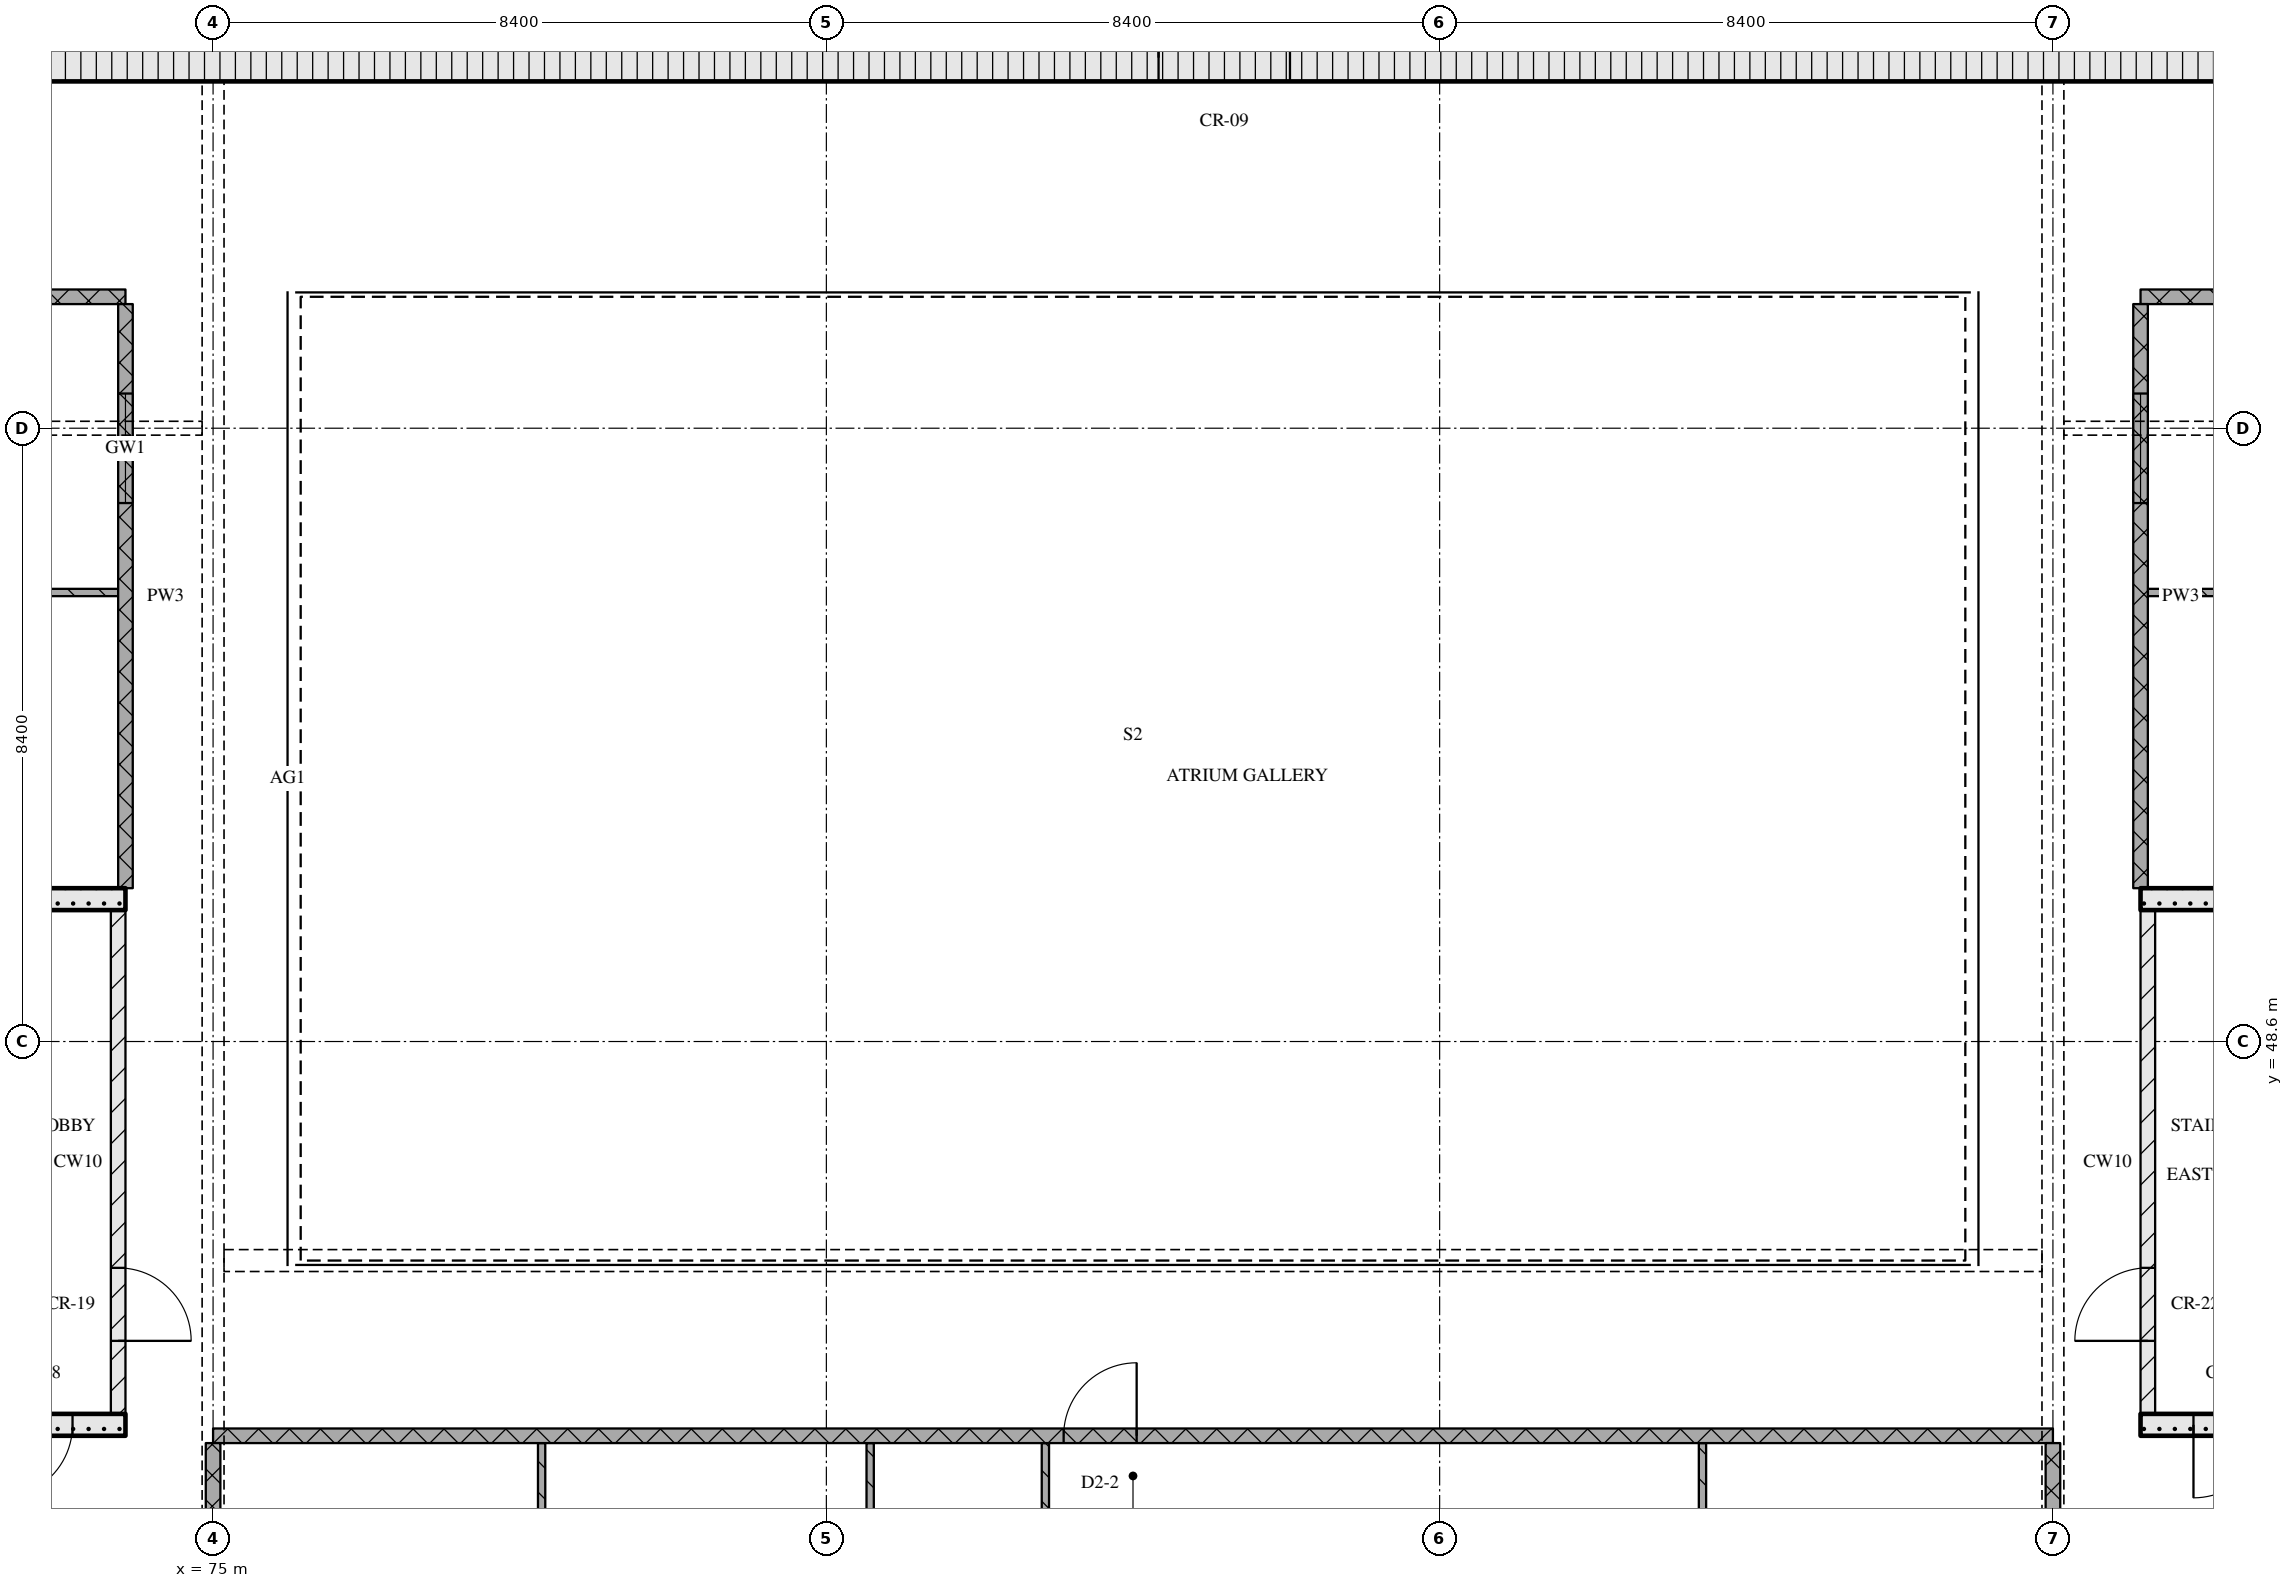
"""IFC4 building model, lengths in metres.
Left out: names, types, materials, properties, quantities, classifications, styles, units other than length and angle.
Written with IfcOpenShell. Run it as: python <this file> out.ifc"""

import sys

from ifc_helpers import new_model, si_unit, direction, frame, frame_2d, origin, place, context, subcontext, project, spatial, rectangle, extrude, element, fill, save


model = new_model("IFC4")
c1 = context("Model", 3, precision=1e-05, world=origin(), true_north=direction((0.0, 1.0)))
c2 = subcontext(c1, "Body", "Model", "MODEL_VIEW")
j1 = project(units=[si_unit("LENGTHUNIT", "METRE"), si_unit("PLANEANGLEUNIT", "RADIAN")], contexts=[c1])
p1 = place(None, origin())
s1 = spatial("IfcSite", under=j1, at=p1, CompositionType="ELEMENT")
p2 = place(p1, origin())
s2 = spatial("IfcBuilding", under=s1, at=p2, CompositionType="ELEMENT")
p3 = place(p2, frame((0.0, 0.0, 223.5)))
s3 = spatial("IfcBuildingStorey", under=s2, at=p3, CompositionType="ELEMENT", Elevation=223.5)
p4 = place(p3, frame((67.15, 62.075, 0.0), z_axis=(0.0, 0.0, 1.0), x_axis=(1.0, 0.0, 0.0)))
e1 = element("IfcWall", 1, at=p4, inside=s3, PredefinedType="SOLIDWALL", context=c2, shape_type="SweptSolid", body=[
    extrude(rectangle(XDim=40.9, YDim=0.65, at=frame_2d((20.45, 0.0))), origin(), (0.0, 0.0, 1.0), 3.32),
])
p5 = place(p4, frame((20.8, 0.0, 0.0)))
e2 = element("IfcOpeningElement", 2, at=p5, cuts=e1, PredefinedType="OPENING", context=c2, shape_type="SweptSolid", body=[
    extrude(rectangle(XDim=1.8, YDim=2.1, at=frame_2d((0.9, 1.05))), frame((0.0, 0.335, 0.0), z_axis=(0.0, -1.0, 0.0), x_axis=(1.0, 0.0, 0.0)), (0.0, 0.0, 1.0), 0.67),
])
p6 = place(p3, frame((68.2, 43.35, 0.0), z_axis=(0.0, 0.0, 1.0), x_axis=(1.0, 0.0, 0.0)))
e3 = element("IfcWall", 3, at=p6, inside=s3, PredefinedType="SOLIDWALL", context=c2, shape_type="SweptSolid", body=[
    extrude(rectangle(XDim=5.6, YDim=0.3, at=frame_2d((2.8, 0.0))), origin(), (0.0, 0.0, 1.0), 3.32),
])
p7 = place(p6, frame((3.875, 0.0, 0.0)))
e4 = element("IfcOpeningElement", 4, at=p7, cuts=e3, PredefinedType="OPENING", context=c2, shape_type="SweptSolid", body=[
    extrude(rectangle(XDim=1.0, YDim=2.1, at=frame_2d((0.5, 1.05))), frame((0.0, 0.16, 0.0), z_axis=(0.0, -1.0, 0.0), x_axis=(1.0, 0.0, 0.0)), (0.0, 0.0, 1.0), 0.32),
])
p8 = place(p3, frame((73.7, 43.5, 0.0), z_axis=(0.0, 0.0, 1.0), x_axis=(0.0, 1.0, 0.0)))
e5 = element("IfcWall", 5, at=p8, inside=s3, PredefinedType="PARTITIONING", context=c2, shape_type="SweptSolid", body=[
    extrude(rectangle(XDim=6.9, YDim=0.2, at=frame_2d((3.45, 0.0))), origin(), (0.0, 0.0, 1.0), 3.32),
])
p9 = place(p8, frame((1.0, 0.0, 0.0)))
e6 = element("IfcOpeningElement", 6, at=p9, cuts=e5, PredefinedType="OPENING", context=c2, shape_type="SweptSolid", body=[
    extrude(rectangle(XDim=1.0, YDim=2.1, at=frame_2d((0.5, 1.05))), frame((0.0, 0.11, 0.0), z_axis=(0.0, -1.0, 0.0), x_axis=(1.0, 0.0, 0.0)), (0.0, 0.0, 1.0), 0.22),
])
p10 = place(p3, frame((68.2, 50.55, 0.0), z_axis=(0.0, 0.0, 1.0), x_axis=(1.0, 0.0, 0.0)))
e7 = element("IfcWall", 7, at=p10, inside=s3, PredefinedType="SOLIDWALL", context=c2, shape_type="SweptSolid", body=[
    extrude(rectangle(XDim=5.6, YDim=0.3, at=frame_2d((2.8, 0.0))), origin(), (0.0, 0.0, 1.0), 3.32),
])
p11 = place(p3, frame((101.4, 43.35, 0.0), z_axis=(0.0, 0.0, 1.0), x_axis=(1.0, 0.0, 0.0)))
e8 = element("IfcWall", 8, at=p11, inside=s3, PredefinedType="SOLIDWALL", context=c2, shape_type="SweptSolid", body=[
    extrude(rectangle(XDim=5.6, YDim=0.3, at=frame_2d((2.8, 0.0))), origin(), (0.0, 0.0, 1.0), 3.32),
])
p12 = place(p11, frame((0.725, 0.0, 0.0)))
e9 = element("IfcOpeningElement", 9, at=p12, cuts=e8, PredefinedType="OPENING", context=c2, shape_type="SweptSolid", body=[
    extrude(rectangle(XDim=1.0, YDim=2.1, at=frame_2d((0.5, 1.05))), frame((0.0, 0.16, 0.0), z_axis=(0.0, -1.0, 0.0), x_axis=(1.0, 0.0, 0.0)), (0.0, 0.0, 1.0), 0.32),
])
p13 = place(p3, frame((101.5, 43.5, 0.0), z_axis=(0.0, 0.0, 1.0), x_axis=(0.0, 1.0, 0.0)))
e10 = element("IfcWall", 10, at=p13, inside=s3, PredefinedType="PARTITIONING", context=c2, shape_type="SweptSolid", body=[
    extrude(rectangle(XDim=6.9, YDim=0.2, at=frame_2d((3.45, 0.0))), origin(), (0.0, 0.0, 1.0), 3.32),
])
p14 = place(p13, frame((1.0, 0.0, 0.0)))
e11 = element("IfcOpeningElement", 11, at=p14, cuts=e10, PredefinedType="OPENING", context=c2, shape_type="SweptSolid", body=[
    extrude(rectangle(XDim=1.0, YDim=2.1, at=frame_2d((0.5, 1.05))), frame((0.0, 0.11, 0.0), z_axis=(0.0, -1.0, 0.0), x_axis=(1.0, 0.0, 0.0)), (0.0, 0.0, 1.0), 0.22),
])
p15 = place(p3, frame((101.4, 50.55, 0.0), z_axis=(0.0, 0.0, 1.0), x_axis=(1.0, 0.0, 0.0)))
e12 = element("IfcWall", 12, at=p15, inside=s3, PredefinedType="SOLIDWALL", context=c2, shape_type="SweptSolid", body=[
    extrude(rectangle(XDim=5.6, YDim=0.3, at=frame_2d((2.8, 0.0))), origin(), (0.0, 0.0, 1.0), 3.32),
])
p16 = place(p3, frame((100.2, 43.2, 0.0), z_axis=(0.0, 0.0, 1.0), x_axis=(-1.0, 0.0, 0.0)))
e13 = element("IfcWall", 13, at=p16, inside=s3, PredefinedType="PARTITIONING", context=c2, shape_type="SweptSolid", body=[
    extrude(rectangle(XDim=25.2, YDim=0.2, at=frame_2d((12.6, 0.0))), origin(), (0.0, 0.0, 1.0), 3.32),
])
p17 = place(p16, frame((12.55, 0.0, 0.0)))
e14 = element("IfcOpeningElement", 14, at=p17, cuts=e13, PredefinedType="OPENING", context=c2, shape_type="SweptSolid", body=[
    extrude(rectangle(XDim=1.0, YDim=2.1, at=frame_2d((0.5, 1.05))), frame((0.0, 0.11, 0.0), z_axis=(0.0, -1.0, 0.0), x_axis=(1.0, 0.0, 0.0)), (0.0, 0.0, 1.0), 0.22),
])
p18 = place(p3, frame((67.5, 54.75, 0.0), z_axis=(0.0, 0.0, 1.0), x_axis=(1.0, 0.0, 0.0)))
e15 = element("IfcWall", 15, at=p18, inside=s3, PredefinedType="PARTITIONING", context=c2, shape_type="SweptSolid", body=[
    extrude(rectangle(XDim=6.2, YDim=0.1, at=frame_2d((3.1, 0.0))), origin(), (0.0, 0.0, 1.0), 3.32),
])
p19 = place(p3, frame((101.5, 54.75, 0.0), z_axis=(0.0, 0.0, 1.0), x_axis=(1.0, 0.0, 0.0)))
e16 = element("IfcWall", 16, at=p19, inside=s3, PredefinedType="PARTITIONING", context=c2, shape_type="SweptSolid", body=[
    extrude(rectangle(XDim=6.8, YDim=0.1, at=frame_2d((3.4, 0.0))), origin(), (0.0, 0.0, 1.0), 3.32),
])
p20 = place(p19, frame((2.9, 0.0, 0.0)))
e17 = element("IfcOpeningElement", 17, at=p20, cuts=e16, PredefinedType="OPENING", context=c2, shape_type="SweptSolid", body=[
    extrude(rectangle(XDim=0.9, YDim=2.1, at=frame_2d((0.45, 1.05))), frame((0.0, 0.06, 0.0), z_axis=(0.0, -1.0, 0.0), x_axis=(1.0, 0.0, 0.0)), (0.0, 0.0, 1.0), 0.12),
])
for number, where, z_axis, x_axis in (
    (18, (63.0, 58.8, 0.0), (0.0, 0.0, 1.0), (1.0, 0.0, 0.0)),
    (19, (101.4, 58.8, 0.0), (0.0, 0.0, 1.0), (1.0, 0.0, 0.0)),
):
    element("IfcWall", number, at=place(p3, frame(where, z_axis=z_axis, x_axis=x_axis)), inside=s3, PredefinedType="PARTITIONING", context=c2, shape_type="SweptSolid", body=[
        extrude(rectangle(XDim=10.8, YDim=0.2, at=frame_2d((5.4, 0.0))), origin(), (0.0, 0.0, 1.0), 3.32),
    ])
p21 = place(p3, frame((73.8, 58.7, 0.0), z_axis=(0.0, 0.0, 1.0), x_axis=(0.0, -1.0, 0.0)))
e20 = element("IfcWall", 20, at=p21, inside=s3, PredefinedType="PARTITIONING", context=c2, shape_type="SweptSolid", body=[
    extrude(rectangle(XDim=8.0, YDim=0.2, at=frame_2d((4.0, 0.0))), origin(), (0.0, 0.0, 1.0), 3.32),
])
p22 = place(p21, frame((1.225, 0.0, 0.9)))
e21 = element("IfcOpeningElement", 21, at=p22, cuts=e20, PredefinedType="OPENING", context=c2, shape_type="SweptSolid", body=[
    extrude(rectangle(XDim=1.5, YDim=1.5, at=frame_2d((0.75, 0.75))), frame((0.0, 0.11, 0.0), z_axis=(0.0, -1.0, 0.0), x_axis=(1.0, 0.0, 0.0)), (0.0, 0.0, 1.0), 0.22),
])
p23 = place(p3, frame((75.0, 43.1, 0.0), z_axis=(0.0, 0.0, 1.0), x_axis=(0.0, -1.0, 0.0)))
e22 = element("IfcWall", 22, at=p23, inside=s3, PredefinedType="PARTITIONING", context=c2, shape_type="SweptSolid", body=[
    extrude(rectangle(XDim=2.2, YDim=0.2, at=frame_2d((1.1, 0.0))), origin(), (0.0, 0.0, 1.0), 2.53),
])
for number, where, z_axis, x_axis in (
    (23, (79.5, 43.1, 0.0), (0.0, 0.0, 1.0), (0.0, -1.0, 0.0)),
    (24, (84.0, 43.1, 0.0), (0.0, 0.0, 1.0), (0.0, -1.0, 0.0)),
    (25, (86.4, 43.1, 0.0), (0.0, 0.0, 1.0), (0.0, -1.0, 0.0)),
    (26, (95.4, 43.1, 0.0), (0.0, 0.0, 1.0), (0.0, -1.0, 0.0)),
):
    element("IfcWall", number, at=place(p3, frame(where, z_axis=z_axis, x_axis=x_axis)), inside=s3, PredefinedType="PARTITIONING", context=c2, shape_type="SweptSolid", body=[
        extrude(rectangle(XDim=4.95, YDim=0.1, at=frame_2d((2.475, 0.0))), origin(), (0.0, 0.0, 1.0), 3.32),
    ])
p24 = place(p3, frame((100.2, 43.1, 0.0), z_axis=(0.0, 0.0, 1.0), x_axis=(0.0, -1.0, 0.0)))
e27 = element("IfcWall", 27, at=p24, inside=s3, PredefinedType="PARTITIONING", context=c2, shape_type="SweptSolid", body=[
    extrude(rectangle(XDim=2.2, YDim=0.2, at=frame_2d((1.1, 0.0))), origin(), (0.0, 0.0, 1.0), 2.53),
])
p25 = place(p3, frame((101.4, 58.7, 0.0), z_axis=(0.0, 0.0, 1.0), x_axis=(0.0, -1.0, 0.0)))
e28 = element("IfcWall", 28, at=p25, inside=s3, PredefinedType="PARTITIONING", context=c2, shape_type="SweptSolid", body=[
    extrude(rectangle(XDim=8.0, YDim=0.2, at=frame_2d((4.0, 0.0))), origin(), (0.0, 0.0, 1.0), 3.32),
])
p26 = place(p25, frame((1.225, 0.0, 0.9)))
e29 = element("IfcOpeningElement", 29, at=p26, cuts=e28, PredefinedType="OPENING", context=c2, shape_type="SweptSolid", body=[
    extrude(rectangle(XDim=1.5, YDim=1.5, at=frame_2d((0.75, 0.75))), frame((0.0, 0.11, 0.0), z_axis=(0.0, -1.0, 0.0), x_axis=(1.0, 0.0, 0.0)), (0.0, 0.0, 1.0), 0.22),
])
p27 = place(p5, origin())
e30 = element("IfcDoor", 30, at=p27, inside=s3, OperationType="DOUBLE_DOOR_SINGLE_SWING", PredefinedType="DOOR", context=c2, shape_type="SweptSolid", body=[
    extrude(rectangle(XDim=1.8, YDim=2.1, at=frame_2d((0.9, 1.05))), frame((0.0, 0.025, 0.0), z_axis=(0.0, -1.0, 0.0), x_axis=(1.0, 0.0, 0.0)), (0.0, 0.0, 1.0), 0.05),
])
fill(e2, e30)
p28 = place(p7, origin())
e31 = element("IfcDoor", 31, at=p28, inside=s3, OperationType="SINGLE_SWING_RIGHT", PredefinedType="DOOR", context=c2, shape_type="SweptSolid", body=[
    extrude(rectangle(XDim=1.0, YDim=2.1, at=frame_2d((0.5, 1.05))), frame((0.0, 0.025, 0.0), z_axis=(0.0, -1.0, 0.0), x_axis=(1.0, 0.0, 0.0)), (0.0, 0.0, 1.0), 0.05),
])
fill(e4, e31)
p29 = place(p9, origin())
e32 = element("IfcDoor", 32, at=p29, inside=s3, OperationType="SINGLE_SWING_RIGHT", PredefinedType="DOOR", context=c2, shape_type="SweptSolid", body=[
    extrude(rectangle(XDim=1.0, YDim=2.1, at=frame_2d((0.5, 1.05))), frame((0.0, 0.025, 0.0), z_axis=(0.0, -1.0, 0.0), x_axis=(1.0, 0.0, 0.0)), (0.0, 0.0, 1.0), 0.05),
])
fill(e6, e32)
p30 = place(p12, origin())
e33 = element("IfcDoor", 33, at=p30, inside=s3, OperationType="SINGLE_SWING_RIGHT", PredefinedType="DOOR", context=c2, shape_type="SweptSolid", body=[
    extrude(rectangle(XDim=1.0, YDim=2.1, at=frame_2d((0.5, 1.05))), frame((0.0, 0.025, 0.0), z_axis=(0.0, -1.0, 0.0), x_axis=(1.0, 0.0, 0.0)), (0.0, 0.0, 1.0), 0.05),
])
fill(e9, e33)
p31 = place(p14, origin())
e34 = element("IfcDoor", 34, at=p31, inside=s3, OperationType="SINGLE_SWING_LEFT", PredefinedType="DOOR", context=c2, shape_type="SweptSolid", body=[
    extrude(rectangle(XDim=1.0, YDim=2.1, at=frame_2d((0.5, 1.05))), frame((0.0, 0.025, 0.0), z_axis=(0.0, -1.0, 0.0), x_axis=(1.0, 0.0, 0.0)), (0.0, 0.0, 1.0), 0.05),
])
fill(e11, e34)
p32 = place(p17, origin())
e35 = element("IfcDoor", 35, at=p32, inside=s3, OperationType="SINGLE_SWING_RIGHT", PredefinedType="DOOR", context=c2, shape_type="SweptSolid", body=[
    extrude(rectangle(XDim=1.0, YDim=2.1, at=frame_2d((0.5, 1.05))), frame((0.0, 0.025, 0.0), z_axis=(0.0, -1.0, 0.0), x_axis=(1.0, 0.0, 0.0)), (0.0, 0.0, 1.0), 0.05),
])
fill(e14, e35)
p33 = place(p22, origin())
e36 = element("IfcWindow", 36, at=p33, inside=s3, PartitioningType="SINGLE_PANEL", PredefinedType="WINDOW", context=c2, shape_type="SweptSolid", body=[
    extrude(rectangle(XDim=1.5, YDim=1.5, at=frame_2d((0.75, 0.75))), frame((0.0, 0.03, 0.0), z_axis=(0.0, -1.0, 0.0), x_axis=(1.0, 0.0, 0.0)), (0.0, 0.0, 1.0), 0.06),
])
fill(e21, e36)
p34 = place(p26, origin())
e37 = element("IfcWindow", 37, at=p34, inside=s3, PartitioningType="SINGLE_PANEL", PredefinedType="WINDOW", context=c2, shape_type="SweptSolid", body=[
    extrude(rectangle(XDim=1.5, YDim=1.5, at=frame_2d((0.75, 0.75))), frame((0.0, 0.03, 0.0), z_axis=(0.0, -1.0, 0.0), x_axis=(1.0, 0.0, 0.0)), (0.0, 0.0, 1.0), 0.06),
])
fill(e29, e37)
save(model, sys.argv[1])
